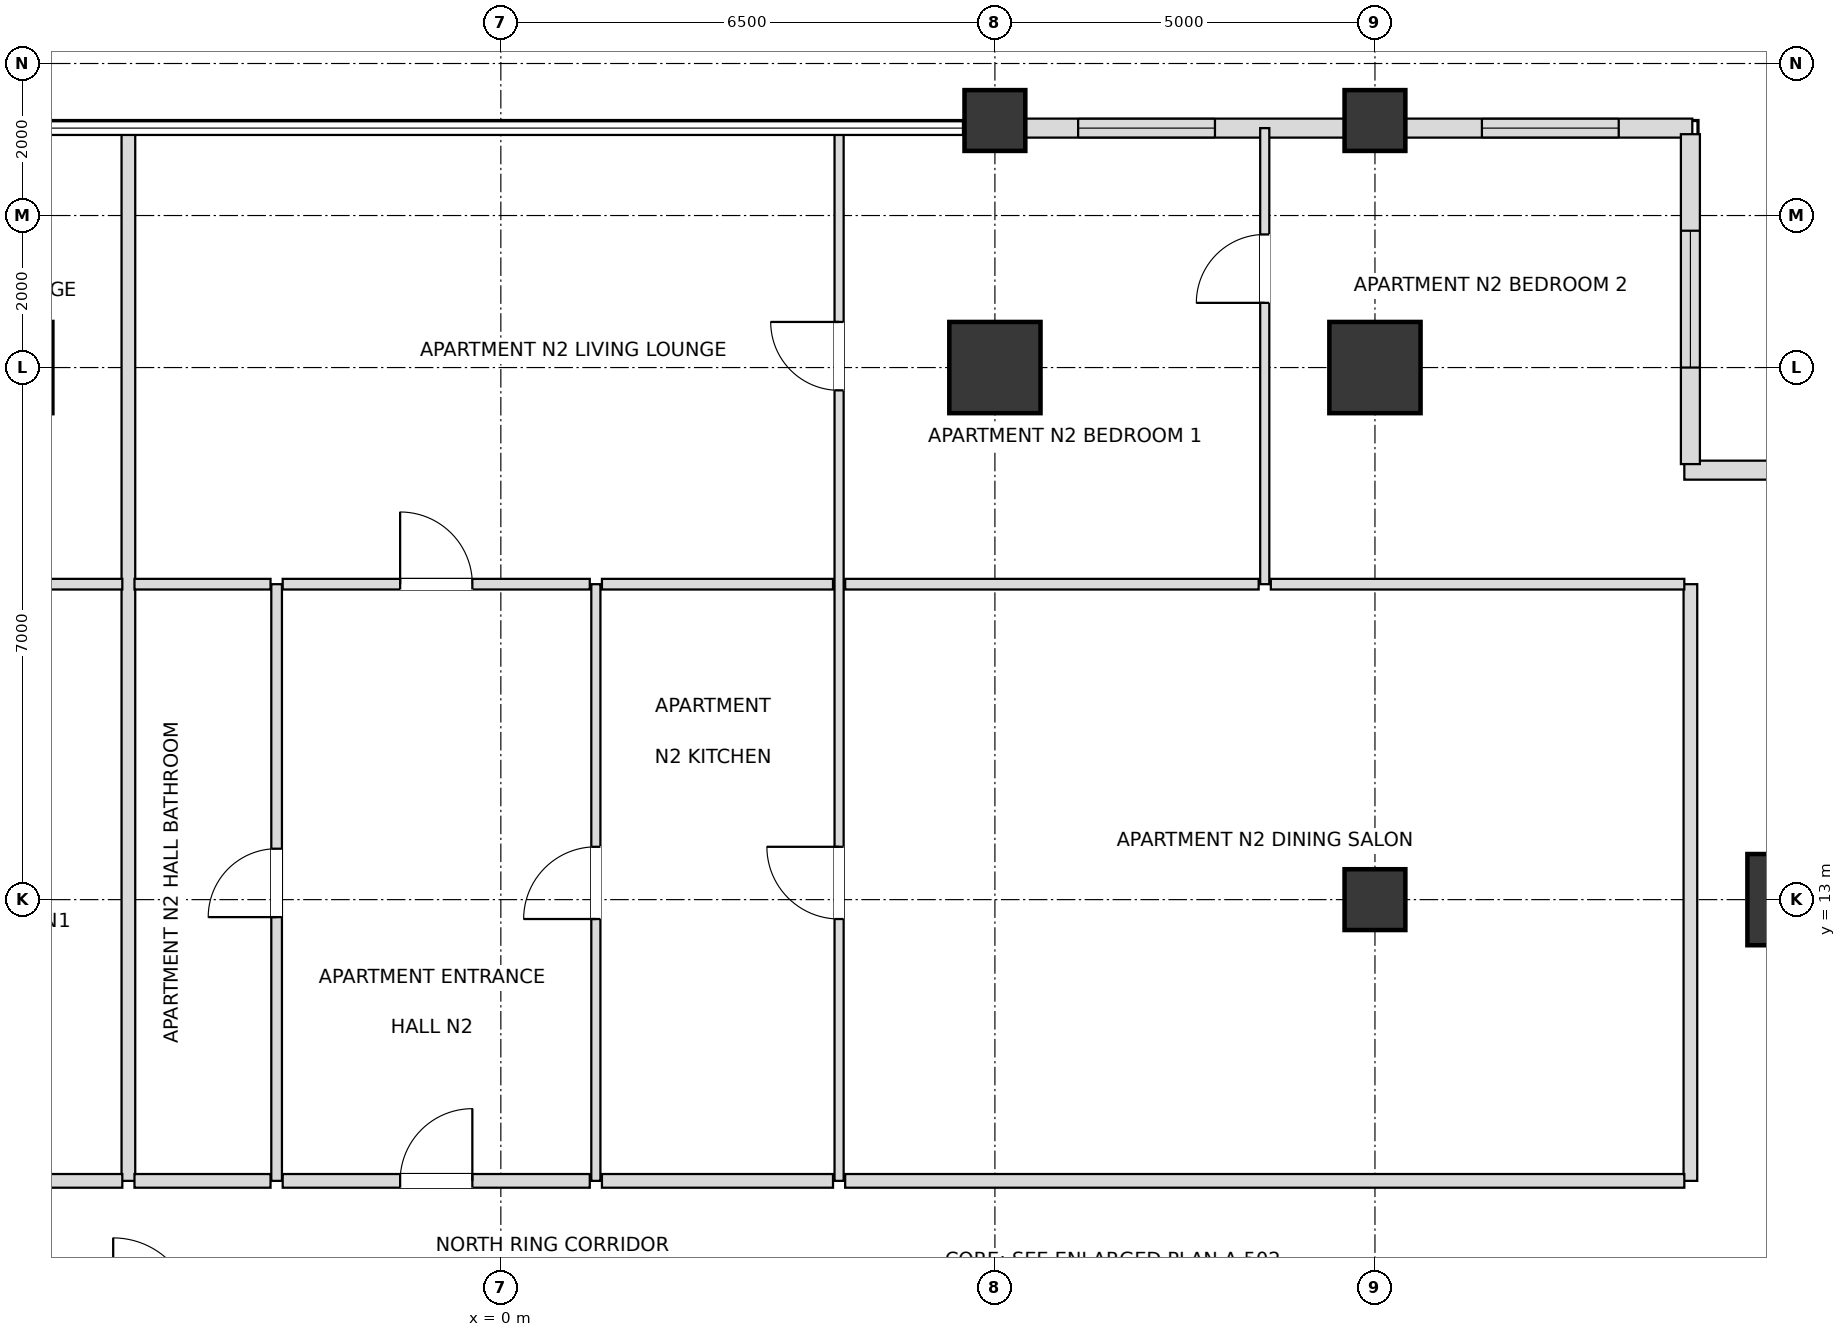
"""IFC4 building model, lengths in metres.
Left out: names, types, materials, properties, quantities, classifications, styles, units other than length and angle.
Written with IfcOpenShell. Run it as: python <this file> out.ifc"""

import sys

from ifc_helpers import new_model, si_unit, direction, frame, frame_2d, origin, origin_2d, place, context, subcontext, project, spatial, rectangle, extrude, element, fill, save


model = new_model("IFC4")
c1 = context("Model", 3, precision=1e-05, world=origin(), true_north=direction((0.0, 1.0)))
c2 = subcontext(c1, "Body", "Model", "MODEL_VIEW")
j1 = project(units=[si_unit("LENGTHUNIT", "METRE"), si_unit("PLANEANGLEUNIT", "RADIAN")], contexts=[c1])
p1 = place(None, origin())
s1 = spatial("IfcSite", under=j1, at=p1, CompositionType="ELEMENT")
p2 = place(p1, origin())
s2 = spatial("IfcBuilding", under=s1, at=p2, CompositionType="ELEMENT")
p3 = place(p2, frame((0.0, 0.0, 102.6)))
s3 = spatial("IfcBuildingStorey", under=s2, at=p3, CompositionType="ELEMENT", Elevation=102.6)
for number, where, z_axis, x_axis in (
    (1, (17.0, 13.0, 0.0), (0.0, 0.0, 1.0), (1.0, 0.0, 0.0)),
    (2, (11.5, 20.0, 0.0), (0.0, 0.0, 1.0), (1.0, 0.0, 0.0)),
    (3, (6.5, 20.0, 0.0), (0.0, 0.0, 1.0), (1.0, 0.0, 0.0)),
):
    element("IfcColumn", number, at=place(p3, frame(where, z_axis=z_axis, x_axis=x_axis)), inside=s3, PredefinedType="USERDEFINED", context=c2, shape_type="SweptSolid", body=[
        extrude(rectangle(XDim=1.2, YDim=1.2, at=origin_2d()), origin(), (0.0, 0.0, 1.0), 3.6),
    ])
for number, where, z_axis, x_axis in (
    (4, (11.5, 13.0, 0.0), (0.0, 0.0, 1.0), (1.0, 0.0, 0.0)),
    (5, (6.5, 23.25, 0.0), (0.0, 0.0, 1.0), (1.0, 0.0, 0.0)),
    (6, (11.5, 23.25, 0.0), (0.0, 0.0, 1.0), (1.0, 0.0, 0.0)),
):
    element("IfcColumn", number, at=place(p3, frame(where, z_axis=z_axis, x_axis=x_axis)), inside=s3, PredefinedType="COLUMN", context=c2, shape_type="SweptSolid", body=[
        extrude(rectangle(XDim=0.8, YDim=0.8, at=origin_2d()), origin(), (0.0, 0.0, 1.0), 3.6),
    ])
p4 = place(p3, frame((15.675, 23.15, 0.0), z_axis=(0.0, 0.0, 1.0), x_axis=(-1.0, 0.0, 0.0)))
e7 = element("IfcWall", 7, at=p4, inside=s3, PredefinedType="SOLIDWALL", context=c2, shape_type="SweptSolid", body=[
    extrude(rectangle(XDim=3.78, YDim=0.25, at=frame_2d((1.89, 0.0))), origin(), (0.0, 0.0, 1.0), 2.736),
])
p5 = place(p4, frame((0.968, 0.0, 0.72)))
e8 = element("IfcOpeningElement", 8, at=p5, cuts=e7, PredefinedType="OPENING", context=c2, shape_type="SweptSolid", body=[
    extrude(rectangle(XDim=1.8, YDim=1.68, at=frame_2d((0.9, 0.84))), frame((0.0, 0.135, 0.0), z_axis=(0.0, -1.0, 0.0), x_axis=(1.0, 0.0, 0.0)), (0.0, 0.0, 1.0), 0.27),
])
p6 = place(p3, frame((11.105, 23.15, 0.0), z_axis=(0.0, 0.0, 1.0), x_axis=(-1.0, 0.0, 0.0)))
e9 = element("IfcWall", 9, at=p6, inside=s3, PredefinedType="SOLIDWALL", context=c2, shape_type="SweptSolid", body=[
    extrude(rectangle(XDim=4.21, YDim=0.25, at=frame_2d((2.105, 0.0))), origin(), (0.0, 0.0, 1.0), 2.736),
])
p7 = place(p6, frame((1.71, 0.0, 0.72)))
e10 = element("IfcOpeningElement", 10, at=p7, cuts=e9, PredefinedType="OPENING", context=c2, shape_type="SweptSolid", body=[
    extrude(rectangle(XDim=1.8, YDim=1.68, at=frame_2d((0.9, 0.84))), frame((0.0, 0.135, 0.0), z_axis=(0.0, -1.0, 0.0), x_axis=(1.0, 0.0, 0.0)), (0.0, 0.0, 1.0), 0.27),
])
p8 = place(p3, frame((20.23, 18.65, 0.0), z_axis=(0.0, 0.0, 1.0), x_axis=(-1.0, 0.0, 0.0)))
e11 = element("IfcWall", 11, at=p8, inside=s3, PredefinedType="SOLIDWALL", context=c2, shape_type="SweptSolid", body=[
    extrude(rectangle(XDim=4.66, YDim=0.25, at=frame_2d((2.33, 0.0))), origin(), (0.0, 0.0, 1.0), 2.736),
])
p9 = place(p8, frame((1.43, 0.0, 0.72)))
e12 = element("IfcOpeningElement", 12, at=p9, cuts=e11, PredefinedType="OPENING", context=c2, shape_type="SweptSolid", body=[
    extrude(rectangle(XDim=1.8, YDim=1.68, at=frame_2d((0.9, 0.84))), frame((0.0, 0.135, 0.0), z_axis=(0.0, -1.0, 0.0), x_axis=(1.0, 0.0, 0.0)), (0.0, 0.0, 1.0), 0.27),
])
p10 = place(p3, frame((15.65, 18.73, 0.0), z_axis=(0.0, 0.0, 1.0), x_axis=(0.0, 1.0, 0.0)))
e13 = element("IfcWall", 13, at=p10, inside=s3, PredefinedType="SOLIDWALL", context=c2, shape_type="SweptSolid", body=[
    extrude(rectangle(XDim=4.34, YDim=0.25, at=frame_2d((2.17, 0.0))), origin(), (0.0, 0.0, 1.0), 2.736),
])
p11 = place(p10, frame((1.27, 0.0, 0.72)))
e14 = element("IfcOpeningElement", 14, at=p11, cuts=e13, PredefinedType="OPENING", context=c2, shape_type="SweptSolid", body=[
    extrude(rectangle(XDim=1.8, YDim=1.68, at=frame_2d((0.9, 0.84))), frame((0.0, 0.135, 0.0), z_axis=(0.0, -1.0, 0.0), x_axis=(1.0, 0.0, 0.0)), (0.0, 0.0, 1.0), 0.27),
])
p12 = place(p3, frame((-4.9, 9.3, 0.0), z_axis=(0.0, 0.0, 1.0), x_axis=(0.0, 1.0, 0.0)))
e15 = element("IfcWall", 15, at=p12, inside=s3, PredefinedType="PARTITIONING", context=c2, shape_type="SweptSolid", body=[
    extrude(rectangle(XDim=13.85, YDim=0.18, at=frame_2d((6.925, 0.0))), origin(), (0.0, 0.0, 1.0), 2.816),
])
p13 = place(p3, frame((-2.95, 9.3, 0.0), z_axis=(0.0, 0.0, 1.0), x_axis=(0.0, 1.0, 0.0)))
e16 = element("IfcWall", 16, at=p13, inside=s3, PredefinedType="PARTITIONING", context=c2, shape_type="SweptSolid", body=[
    extrude(rectangle(XDim=7.85, YDim=0.14, at=frame_2d((3.925, 0.0))), origin(), (0.0, 0.0, 1.0), 3.38),
])
p14 = place(p13, frame((3.47, 0.0, 0.0)))
e17 = element("IfcOpeningElement", 17, at=p14, cuts=e16, PredefinedType="OPENING", context=c2, shape_type="SweptSolid", body=[
    extrude(rectangle(XDim=0.9, YDim=2.1, at=frame_2d((0.45, 1.05))), frame((0.0, 0.08, 0.0), z_axis=(0.0, -1.0, 0.0), x_axis=(1.0, 0.0, 0.0)), (0.0, 0.0, 1.0), 0.16),
])
p15 = place(p3, frame((1.25, 9.3, 0.0), z_axis=(0.0, 0.0, 1.0), x_axis=(0.0, 1.0, 0.0)))
e18 = element("IfcWall", 18, at=p15, inside=s3, PredefinedType="PARTITIONING", context=c2, shape_type="SweptSolid", body=[
    extrude(rectangle(XDim=7.85, YDim=0.12, at=frame_2d((3.925, 0.0))), origin(), (0.0, 0.0, 1.0), 3.38),
])
p16 = place(p15, frame((3.445, 0.0, 0.0)))
e19 = element("IfcOpeningElement", 19, at=p16, cuts=e18, PredefinedType="OPENING", context=c2, shape_type="SweptSolid", body=[
    extrude(rectangle(XDim=0.95, YDim=2.1, at=frame_2d((0.475, 1.05))), frame((0.0, 0.07, 0.0), z_axis=(0.0, -1.0, 0.0), x_axis=(1.0, 0.0, 0.0)), (0.0, 0.0, 1.0), 0.14),
])
p17 = place(p3, frame((4.45, 9.3, 0.0), z_axis=(0.0, 0.0, 1.0), x_axis=(0.0, 1.0, 0.0)))
e20 = element("IfcWall", 20, at=p17, inside=s3, PredefinedType="PARTITIONING", context=c2, shape_type="SweptSolid", body=[
    extrude(rectangle(XDim=13.85, YDim=0.12, at=frame_2d((6.925, 0.0))), origin(), (0.0, 0.0, 1.0), 2.816),
])
p18 = place(p17, frame((3.445, 0.0, 0.0)))
e21 = element("IfcOpeningElement", 21, at=p18, cuts=e20, PredefinedType="OPENING", context=c2, shape_type="SweptSolid", body=[
    extrude(rectangle(XDim=0.95, YDim=2.1, at=frame_2d((0.475, 1.05))), frame((0.0, 0.07, 0.0), z_axis=(0.0, -1.0, 0.0), x_axis=(1.0, 0.0, 0.0)), (0.0, 0.0, 1.0), 0.14),
])
p19 = place(p17, frame((10.4, 0.0, 0.0)))
e22 = element("IfcOpeningElement", 22, at=p19, cuts=e20, PredefinedType="OPENING", context=c2, shape_type="SweptSolid", body=[
    extrude(rectangle(XDim=0.9, YDim=2.1, at=frame_2d((0.45, 1.05))), frame((0.0, 0.07, 0.0), z_axis=(0.0, -1.0, 0.0), x_axis=(1.0, 0.0, 0.0)), (0.0, 0.0, 1.0), 0.14),
])
p20 = place(p3, frame((10.05, 17.15, 0.0), z_axis=(0.0, 0.0, 1.0), x_axis=(0.0, 1.0, 0.0)))
e23 = element("IfcWall", 23, at=p20, inside=s3, PredefinedType="PARTITIONING", context=c2, shape_type="SweptSolid", body=[
    extrude(rectangle(XDim=6.0, YDim=0.12, at=frame_2d((3.0, 0.0))), origin(), (0.0, 0.0, 1.0), 2.816),
])
p21 = place(p20, frame((3.701, 0.0, 0.0)))
e24 = element("IfcOpeningElement", 24, at=p21, cuts=e23, PredefinedType="OPENING", context=c2, shape_type="SweptSolid", body=[
    extrude(rectangle(XDim=0.9, YDim=2.1, at=frame_2d((0.45, 1.05))), frame((0.0, 0.07, 0.0), z_axis=(0.0, -1.0, 0.0), x_axis=(1.0, 0.0, 0.0)), (0.0, 0.0, 1.0), 0.14),
])
p22 = place(p3, frame((15.65, 9.3, 0.0), z_axis=(0.0, 0.0, 1.0), x_axis=(0.0, 1.0, 0.0)))
e25 = element("IfcWall", 25, at=p22, inside=s3, PredefinedType="PARTITIONING", context=c2, shape_type="SweptSolid", body=[
    extrude(rectangle(XDim=7.85, YDim=0.18, at=frame_2d((3.925, 0.0))), origin(), (0.0, 0.0, 1.0), 2.736),
])
p23 = place(p3, frame((-10.82, 9.3, 0.0), z_axis=(0.0, 0.0, 1.0), x_axis=(1.0, 0.0, 0.0)))
e26 = element("IfcWall", 26, at=p23, inside=s3, PredefinedType="PARTITIONING", context=c2, shape_type="SweptSolid", body=[
    extrude(rectangle(XDim=5.84, YDim=0.18, at=frame_2d((2.92, 0.0))), origin(), (0.0, 0.0, 1.0), 2.816),
])
p24 = place(p23, frame((2.435, 0.0, 0.0)))
e27 = element("IfcOpeningElement", 27, at=p24, cuts=e26, PredefinedType="OPENING", context=c2, shape_type="SweptSolid", body=[
    extrude(rectangle(XDim=0.95, YDim=2.15, at=frame_2d((0.475, 1.075))), frame((0.0, 0.1, 0.0), z_axis=(0.0, -1.0, 0.0), x_axis=(1.0, 0.0, 0.0)), (0.0, 0.0, 1.0), 0.2),
])
p25 = place(p3, frame((-4.82, 9.3, 0.0), z_axis=(0.0, 0.0, 1.0), x_axis=(1.0, 0.0, 0.0)))
e28 = element("IfcWall", 28, at=p25, inside=s3, PredefinedType="PARTITIONING", context=c2, shape_type="SweptSolid", body=[
    extrude(rectangle(XDim=1.79, YDim=0.18, at=frame_2d((0.895, 0.0))), origin(), (0.0, 0.0, 1.0), 3.38),
])
p26 = place(p3, frame((-2.87, 9.3, 0.0), z_axis=(0.0, 0.0, 1.0), x_axis=(1.0, 0.0, 0.0)))
e29 = element("IfcWall", 29, at=p26, inside=s3, PredefinedType="PARTITIONING", context=c2, shape_type="SweptSolid", body=[
    extrude(rectangle(XDim=4.04, YDim=0.18, at=frame_2d((2.02, 0.0))), origin(), (0.0, 0.0, 1.0), 3.38),
])
p27 = place(p26, frame((1.545, 0.0, 0.0)))
e30 = element("IfcOpeningElement", 30, at=p27, cuts=e29, PredefinedType="OPENING", context=c2, shape_type="SweptSolid", body=[
    extrude(rectangle(XDim=0.95, YDim=2.15, at=frame_2d((0.475, 1.075))), frame((0.0, 0.1, 0.0), z_axis=(0.0, -1.0, 0.0), x_axis=(1.0, 0.0, 0.0)), (0.0, 0.0, 1.0), 0.2),
])
p28 = place(p3, frame((1.33, 9.3, 0.0), z_axis=(0.0, 0.0, 1.0), x_axis=(1.0, 0.0, 0.0)))
e31 = element("IfcWall", 31, at=p28, inside=s3, PredefinedType="PARTITIONING", context=c2, shape_type="SweptSolid", body=[
    extrude(rectangle(XDim=3.04, YDim=0.18, at=frame_2d((1.52, 0.0))), origin(), (0.0, 0.0, 1.0), 3.38),
])
p29 = place(p3, frame((4.53, 9.3, 0.0), z_axis=(0.0, 0.0, 1.0), x_axis=(1.0, 0.0, 0.0)))
e32 = element("IfcWall", 32, at=p29, inside=s3, PredefinedType="PARTITIONING", context=c2, shape_type="SweptSolid", body=[
    extrude(rectangle(XDim=11.04, YDim=0.18, at=frame_2d((5.52, 0.0))), origin(), (0.0, 0.0, 1.0), 2.816),
])
p30 = place(p3, frame((-10.82, 17.15, 0.0), z_axis=(0.0, 0.0, 1.0), x_axis=(1.0, 0.0, 0.0)))
e33 = element("IfcWall", 33, at=p30, inside=s3, PredefinedType="PARTITIONING", context=c2, shape_type="SweptSolid", body=[
    extrude(rectangle(XDim=5.84, YDim=0.14, at=frame_2d((2.92, 0.0))), origin(), (0.0, 0.0, 1.0), 2.816),
])
p31 = place(p30, frame((2.435, 0.0, 0.0)))
e34 = element("IfcOpeningElement", 34, at=p31, cuts=e33, PredefinedType="OPENING", context=c2, shape_type="SweptSolid", body=[
    extrude(rectangle(XDim=0.95, YDim=2.1, at=frame_2d((0.475, 1.05))), frame((0.0, 0.08, 0.0), z_axis=(0.0, -1.0, 0.0), x_axis=(1.0, 0.0, 0.0)), (0.0, 0.0, 1.0), 0.16),
])
p32 = place(p3, frame((-4.82, 17.15, 0.0), z_axis=(0.0, 0.0, 1.0), x_axis=(1.0, 0.0, 0.0)))
e35 = element("IfcWall", 35, at=p32, inside=s3, PredefinedType="PARTITIONING", context=c2, shape_type="SweptSolid", body=[
    extrude(rectangle(XDim=1.79, YDim=0.14, at=frame_2d((0.895, 0.0))), origin(), (0.0, 0.0, 1.0), 3.38),
])
p33 = place(p3, frame((-2.87, 17.15, 0.0), z_axis=(0.0, 0.0, 1.0), x_axis=(1.0, 0.0, 0.0)))
e36 = element("IfcWall", 36, at=p33, inside=s3, PredefinedType="PARTITIONING", context=c2, shape_type="SweptSolid", body=[
    extrude(rectangle(XDim=4.04, YDim=0.14, at=frame_2d((2.02, 0.0))), origin(), (0.0, 0.0, 1.0), 3.38),
])
p34 = place(p33, frame((1.545, 0.0, 0.0)))
e37 = element("IfcOpeningElement", 37, at=p34, cuts=e36, PredefinedType="OPENING", context=c2, shape_type="SweptSolid", body=[
    extrude(rectangle(XDim=0.95, YDim=2.1, at=frame_2d((0.475, 1.05))), frame((0.0, 0.08, 0.0), z_axis=(0.0, -1.0, 0.0), x_axis=(1.0, 0.0, 0.0)), (0.0, 0.0, 1.0), 0.16),
])
p35 = place(p3, frame((1.33, 17.15, 0.0), z_axis=(0.0, 0.0, 1.0), x_axis=(1.0, 0.0, 0.0)))
e38 = element("IfcWall", 38, at=p35, inside=s3, PredefinedType="PARTITIONING", context=c2, shape_type="SweptSolid", body=[
    extrude(rectangle(XDim=3.04, YDim=0.14, at=frame_2d((1.52, 0.0))), origin(), (0.0, 0.0, 1.0), 3.38),
])
p36 = place(p3, frame((4.53, 17.15, 0.0), z_axis=(0.0, 0.0, 1.0), x_axis=(1.0, 0.0, 0.0)))
e39 = element("IfcWall", 39, at=p36, inside=s3, PredefinedType="PARTITIONING", context=c2, shape_type="SweptSolid", body=[
    extrude(rectangle(XDim=5.44, YDim=0.14, at=frame_2d((2.72, 0.0))), origin(), (0.0, 0.0, 1.0), 2.816),
])
p37 = place(p3, frame((10.13, 17.15, 0.0), z_axis=(0.0, 0.0, 1.0), x_axis=(1.0, 0.0, 0.0)))
e40 = element("IfcWall", 40, at=p37, inside=s3, PredefinedType="PARTITIONING", context=c2, shape_type="SweptSolid", body=[
    extrude(rectangle(XDim=5.44, YDim=0.14, at=frame_2d((2.72, 0.0))), origin(), (0.0, 0.0, 1.0), 2.736),
])
p38 = place(p5, origin())
e41 = element("IfcWindow", 41, at=p38, inside=s3, PartitioningType="SINGLE_PANEL", PredefinedType="WINDOW", context=c2, shape_type="SweptSolid", body=[
    extrude(rectangle(XDim=1.8, YDim=1.68, at=frame_2d((0.9, 0.84))), frame((0.0, 0.03, 0.0), z_axis=(0.0, -1.0, 0.0), x_axis=(1.0, 0.0, 0.0)), (0.0, 0.0, 1.0), 0.06),
])
fill(e8, e41)
p39 = place(p7, origin())
e42 = element("IfcWindow", 42, at=p39, inside=s3, PartitioningType="SINGLE_PANEL", PredefinedType="WINDOW", context=c2, shape_type="SweptSolid", body=[
    extrude(rectangle(XDim=1.8, YDim=1.68, at=frame_2d((0.9, 0.84))), frame((0.0, 0.03, 0.0), z_axis=(0.0, -1.0, 0.0), x_axis=(1.0, 0.0, 0.0)), (0.0, 0.0, 1.0), 0.06),
])
fill(e10, e42)
p40 = place(p11, origin())
e43 = element("IfcWindow", 43, at=p40, inside=s3, PartitioningType="SINGLE_PANEL", PredefinedType="WINDOW", context=c2, shape_type="SweptSolid", body=[
    extrude(rectangle(XDim=1.8, YDim=1.68, at=frame_2d((0.9, 0.84))), frame((0.0, 0.03, 0.0), z_axis=(0.0, -1.0, 0.0), x_axis=(1.0, 0.0, 0.0)), (0.0, 0.0, 1.0), 0.06),
])
fill(e14, e43)
p41 = place(p14, origin())
e44 = element("IfcDoor", 44, at=p41, inside=s3, OperationType="SINGLE_SWING_LEFT", PredefinedType="DOOR", context=c2, shape_type="SweptSolid", body=[
    extrude(rectangle(XDim=0.9, YDim=2.1, at=frame_2d((0.45, 1.05))), frame((0.0, 0.025, 0.0), z_axis=(0.0, -1.0, 0.0), x_axis=(1.0, 0.0, 0.0)), (0.0, 0.0, 1.0), 0.05),
])
fill(e17, e44)
p42 = place(p27, origin())
e45 = element("IfcDoor", 45, at=p42, inside=s3, OperationType="SINGLE_SWING_RIGHT", PredefinedType="DOOR", context=c2, shape_type="SweptSolid", body=[
    extrude(rectangle(XDim=0.95, YDim=2.15, at=frame_2d((0.475, 1.075))), frame((0.0, 0.025, 0.0), z_axis=(0.0, -1.0, 0.0), x_axis=(1.0, 0.0, 0.0)), (0.0, 0.0, 1.0), 0.05),
])
fill(e30, e45)
p43 = place(p16, origin())
e46 = element("IfcDoor", 46, at=p43, inside=s3, OperationType="SINGLE_SWING_LEFT", PredefinedType="DOOR", context=c2, shape_type="SweptSolid", body=[
    extrude(rectangle(XDim=0.95, YDim=2.1, at=frame_2d((0.475, 1.05))), frame((0.0, 0.025, 0.0), z_axis=(0.0, -1.0, 0.0), x_axis=(1.0, 0.0, 0.0)), (0.0, 0.0, 1.0), 0.05),
])
fill(e19, e46)
p44 = place(p18, origin())
e47 = element("IfcDoor", 47, at=p44, inside=s3, OperationType="SINGLE_SWING_RIGHT", PredefinedType="DOOR", context=c2, shape_type="SweptSolid", body=[
    extrude(rectangle(XDim=0.95, YDim=2.1, at=frame_2d((0.475, 1.05))), frame((0.0, 0.025, 0.0), z_axis=(0.0, -1.0, 0.0), x_axis=(1.0, 0.0, 0.0)), (0.0, 0.0, 1.0), 0.05),
])
fill(e21, e47)
p45 = place(p34, origin())
e48 = element("IfcDoor", 48, at=p45, inside=s3, OperationType="SINGLE_SWING_LEFT", PredefinedType="DOOR", context=c2, shape_type="SweptSolid", body=[
    extrude(rectangle(XDim=0.95, YDim=2.1, at=frame_2d((0.475, 1.05))), frame((0.0, 0.025, 0.0), z_axis=(0.0, -1.0, 0.0), x_axis=(1.0, 0.0, 0.0)), (0.0, 0.0, 1.0), 0.05),
])
fill(e37, e48)
p46 = place(p19, origin())
e49 = element("IfcDoor", 49, at=p46, inside=s3, OperationType="SINGLE_SWING_RIGHT", PredefinedType="DOOR", context=c2, shape_type="SweptSolid", body=[
    extrude(rectangle(XDim=0.9, YDim=2.1, at=frame_2d((0.45, 1.05))), frame((0.0, 0.025, 0.0), z_axis=(0.0, -1.0, 0.0), x_axis=(1.0, 0.0, 0.0)), (0.0, 0.0, 1.0), 0.05),
])
fill(e22, e49)
p47 = place(p21, origin())
e50 = element("IfcDoor", 50, at=p47, inside=s3, OperationType="SINGLE_SWING_LEFT", PredefinedType="DOOR", context=c2, shape_type="SweptSolid", body=[
    extrude(rectangle(XDim=0.9, YDim=2.1, at=frame_2d((0.45, 1.05))), frame((0.0, 0.025, 0.0), z_axis=(0.0, -1.0, 0.0), x_axis=(1.0, 0.0, 0.0)), (0.0, 0.0, 1.0), 0.05),
])
fill(e24, e50)
save(model, sys.argv[1])
